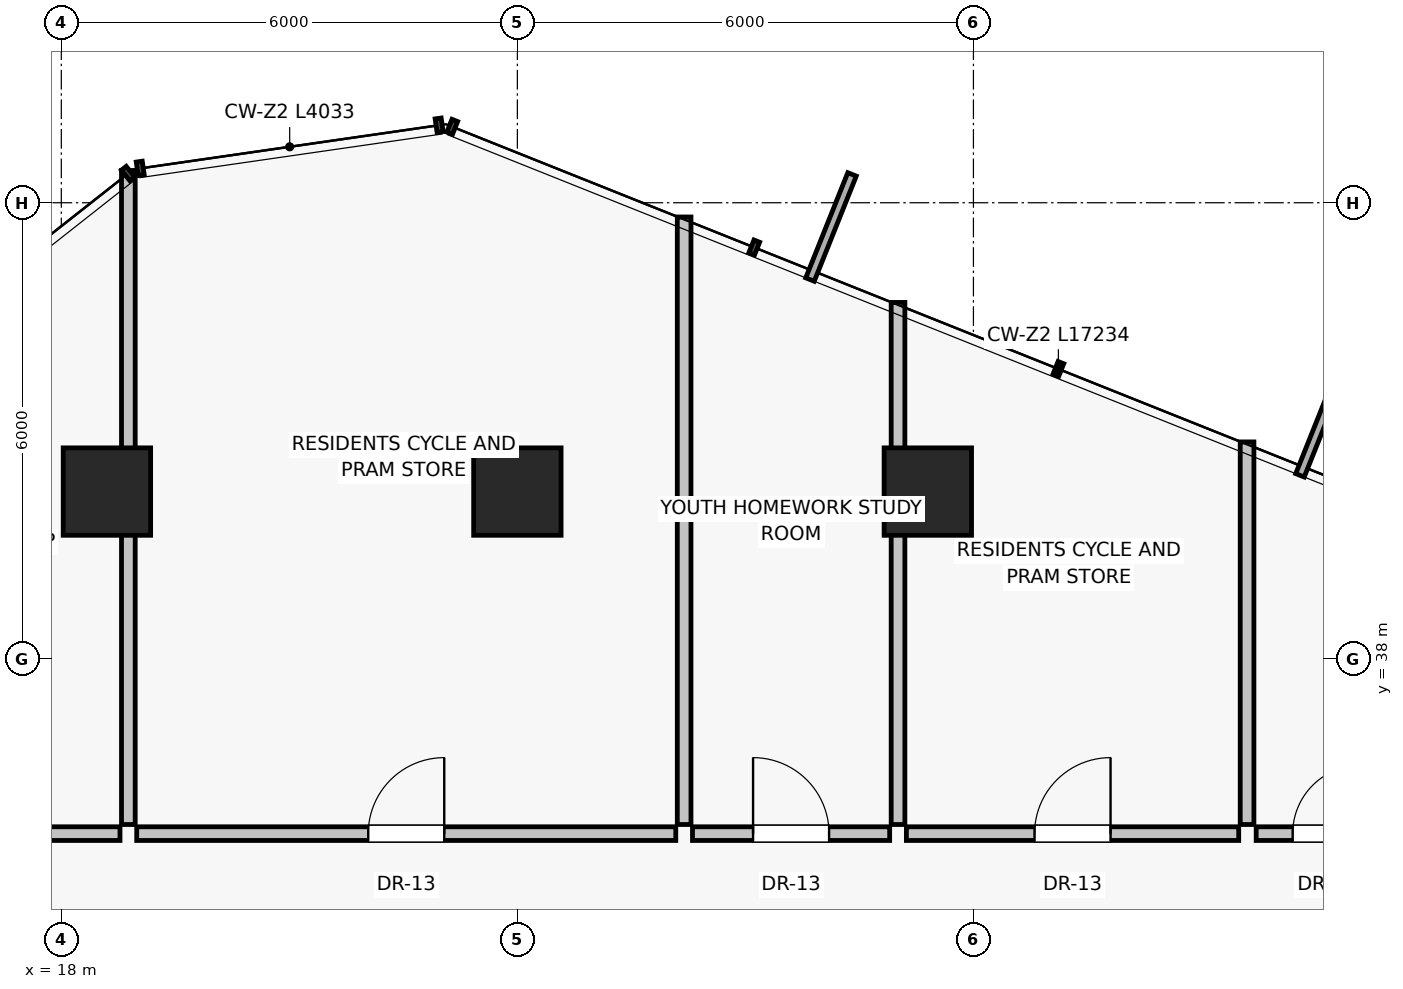
"""IFC4 building model, lengths in metres.
Left out: names, types, materials, properties, quantities, classifications, styles, units other than length and angle.
Written with IfcOpenShell. Run it as: python <this file> out.ifc"""

import sys

from ifc_helpers import new_model, si_unit, direction, frame, frame_2d, origin, origin_2d, place, context, subcontext, project, spatial, rectangle, extrude, source, transform, mapped, element, fill, save


model = new_model("IFC4")
c1 = context("Model", 3, precision=1e-05, world=origin(), true_north=direction((0.0, 1.0)))
c2 = subcontext(c1, "Body", "Model", "MODEL_VIEW")
j1 = project(units=[si_unit("LENGTHUNIT", "METRE"), si_unit("PLANEANGLEUNIT", "RADIAN")], contexts=[c1])
p1 = place(None, origin())
s1 = spatial("IfcSite", under=j1, at=p1, CompositionType="ELEMENT")
p2 = place(p1, origin())
s2 = spatial("IfcBuilding", under=s1, at=p2, CompositionType="ELEMENT")
p3 = place(p2, frame((0.0, 0.0, 155.5)))
s3 = spatial("IfcBuildingStorey", under=s2, at=p3, CompositionType="ELEMENT", Elevation=155.5)
for number, where, z_axis, x_axis in (
    (1, (29.4, 40.2, 0.0), (0.0, 0.0, 1.0), (1.0, 0.0, 0.0)),
    (2, (24.0, 40.2, 0.0), (0.0, 0.0, 1.0), (1.0, 0.0, 0.0)),
    (3, (18.6, 40.2, 0.0), (0.0, 0.0, 1.0), (1.0, 0.0, 0.0)),
):
    element("IfcColumn", number, at=place(p3, frame(where, z_axis=z_axis, x_axis=x_axis)), inside=s3, PredefinedType="COLUMN", context=c2, shape_type="SweptSolid", body=[
        extrude(rectangle(XDim=1.15, YDim=1.15, at=origin_2d()), origin(), (0.0, 0.0, 1.0), 3.25),
    ])
p4 = place(p3, frame((33.6, 35.82, 0.0), z_axis=(0.0, 0.0, 1.0), x_axis=(0.0, 1.0, 0.0)))
e4 = element("IfcWall", 4, at=p4, inside=s3, PredefinedType="PARTITIONING", context=c2, shape_type="SweptSolid", body=[
    extrude(rectangle(XDim=5.033, YDim=0.18, at=frame_2d((2.517, 0.0))), origin(), (0.0, 0.0, 1.0), 2.97),
])
p5 = place(p3, frame((14.51, 35.7, 0.0), z_axis=(0.0, 0.0, 1.0), x_axis=(1.0, 0.0, 0.0)))
e5 = element("IfcWall", 5, at=p5, inside=s3, PredefinedType="PARTITIONING", context=c2, shape_type="SweptSolid", body=[
    extrude(rectangle(XDim=4.262, YDim=0.18, at=frame_2d((2.131, 0.0))), origin(), (0.0, 0.0, 1.0), 2.55),
])
p6 = place(p5, frame((1.631, 0.0, 0.0)))
e6 = element("IfcOpeningElement", 6, at=p6, cuts=e5, PredefinedType="OPENING", context=c2, shape_type="SweptSolid", body=[
    extrude(rectangle(XDim=1.0, YDim=2.01, at=frame_2d((0.5, 1.005))), frame((0.0, 0.1, 0.0), z_axis=(0.0, -1.0, 0.0), x_axis=(1.0, 0.0, 0.0)), (0.0, 0.0, 1.0), 0.2),
])
p7 = place(p3, frame((18.992, 35.7, 0.0), z_axis=(0.0, 0.0, 1.0), x_axis=(1.0, 0.0, 0.0)))
e7 = element("IfcWall", 7, at=p7, inside=s3, PredefinedType="PARTITIONING", context=c2, shape_type="SweptSolid", body=[
    extrude(rectangle(XDim=7.092, YDim=0.18, at=frame_2d((3.546, 0.0))), origin(), (0.0, 0.0, 1.0), 2.55),
])
p8 = place(p7, frame((3.046, 0.0, 0.0)))
e8 = element("IfcOpeningElement", 8, at=p8, cuts=e7, PredefinedType="OPENING", context=c2, shape_type="SweptSolid", body=[
    extrude(rectangle(XDim=1.0, YDim=2.01, at=frame_2d((0.5, 1.005))), frame((0.0, 0.1, 0.0), z_axis=(0.0, -1.0, 0.0), x_axis=(1.0, 0.0, 0.0)), (0.0, 0.0, 1.0), 0.2),
])
p9 = place(p3, frame((18.882, 35.82, 0.0), z_axis=(0.0, 0.0, 1.0), x_axis=(0.0, 1.0, 0.0)))
e9 = element("IfcWall", 9, at=p9, inside=s3, PredefinedType="PARTITIONING", context=c2, shape_type="SweptSolid", body=[
    extrude(rectangle(XDim=8.604, YDim=0.18, at=frame_2d((4.302, 0.0))), origin(), (0.0, 0.0, 1.0), 2.348),
])
p10 = place(p3, frame((26.194, 35.82, 0.0), z_axis=(0.0, 0.0, 1.0), x_axis=(0.0, 1.0, 0.0)))
e10 = element("IfcWall", 10, at=p10, inside=s3, PredefinedType="PARTITIONING", context=c2, shape_type="SweptSolid", body=[
    extrude(rectangle(XDim=7.993, YDim=0.18, at=frame_2d((3.996, 0.0))), origin(), (0.0, 0.0, 1.0), 2.97),
])
p11 = place(p3, frame((26.304, 35.7, 0.0), z_axis=(0.0, 0.0, 1.0), x_axis=(1.0, 0.0, 0.0)))
e11 = element("IfcWall", 11, at=p11, inside=s3, PredefinedType="PARTITIONING", context=c2, shape_type="SweptSolid", body=[
    extrude(rectangle(XDim=2.594, YDim=0.18, at=frame_2d((1.297, 0.0))), origin(), (0.0, 0.0, 1.0), 2.55),
])
p12 = place(p11, frame((0.797, 0.0, 0.0)))
e12 = element("IfcOpeningElement", 12, at=p12, cuts=e11, PredefinedType="OPENING", context=c2, shape_type="SweptSolid", body=[
    extrude(rectangle(XDim=1.0, YDim=2.01, at=frame_2d((0.5, 1.005))), frame((0.0, 0.1, 0.0), z_axis=(0.0, -1.0, 0.0), x_axis=(1.0, 0.0, 0.0)), (0.0, 0.0, 1.0), 0.2),
])
p13 = place(p3, frame((29.118, 35.7, 0.0), z_axis=(0.0, 0.0, 1.0), x_axis=(1.0, 0.0, 0.0)))
e13 = element("IfcWall", 13, at=p13, inside=s3, PredefinedType="PARTITIONING", context=c2, shape_type="SweptSolid", body=[
    extrude(rectangle(XDim=4.372, YDim=0.18, at=frame_2d((2.186, 0.0))), origin(), (0.0, 0.0, 1.0), 2.55),
])
p14 = place(p13, frame((1.686, 0.0, 0.0)))
e14 = element("IfcOpeningElement", 14, at=p14, cuts=e13, PredefinedType="OPENING", context=c2, shape_type="SweptSolid", body=[
    extrude(rectangle(XDim=1.0, YDim=2.01, at=frame_2d((0.5, 1.005))), frame((0.0, 0.1, 0.0), z_axis=(0.0, -1.0, 0.0), x_axis=(1.0, 0.0, 0.0)), (0.0, 0.0, 1.0), 0.2),
])
p15 = place(p3, frame((29.008, 35.82, 0.0), z_axis=(0.0, 0.0, 1.0), x_axis=(0.0, 1.0, 0.0)))
e15 = element("IfcWall", 15, at=p15, inside=s3, PredefinedType="PARTITIONING", context=c2, shape_type="SweptSolid", body=[
    extrude(rectangle(XDim=6.868, YDim=0.18, at=frame_2d((3.434, 0.0))), origin(), (0.0, 0.0, 1.0), 2.348),
])
p16 = place(p3, frame((33.72, 35.7, 0.0), z_axis=(0.0, 0.0, 1.0), x_axis=(1.0, 0.0, 0.0)))
e16 = element("IfcWall", 16, at=p16, inside=s3, PredefinedType="PARTITIONING", context=c2, shape_type="SweptSolid", body=[
    extrude(rectangle(XDim=1.86, YDim=0.18, at=frame_2d((0.93, 0.0))), origin(), (0.0, 0.0, 1.0), 2.97),
])
p17 = place(p16, frame((0.48, 0.0, 0.0)))
e17 = element("IfcOpeningElement", 17, at=p17, cuts=e16, PredefinedType="OPENING", context=c2, shape_type="SweptSolid", body=[
    extrude(rectangle(XDim=0.9, YDim=2.01, at=frame_2d((0.45, 1.005))), frame((0.0, 0.1, 0.0), z_axis=(0.0, -1.0, 0.0), x_axis=(1.0, 0.0, 0.0)), (0.0, 0.0, 1.0), 0.2),
])
m1 = source(origin(), c2, "Body", "SweptSolid", [
    extrude(rectangle(XDim=1.0, YDim=2.01, at=frame_2d((0.5, 1.005))), frame((0.0, 0.025, 0.0), z_axis=(0.0, -1.0, 0.0), x_axis=(1.0, 0.0, 0.0)), (0.0, 0.0, 1.0), 0.05),
])
p18 = place(p8, origin())
e18 = element("IfcDoor", 18, at=p18, inside=s3, OperationType="SINGLE_SWING_RIGHT", PredefinedType="DOOR", context=c2, shape_type="MappedRepresentation", body=[
    mapped(m1, transform((0.0, 0.0, 0.0), scale=1.0)),
])
fill(e8, e18)
p19 = place(p12, origin())
e19 = element("IfcDoor", 19, at=p19, inside=s3, OperationType="SINGLE_SWING_LEFT", PredefinedType="DOOR", context=c2, shape_type="MappedRepresentation", body=[
    mapped(m1, transform((0.0, 0.0, 0.0), scale=1.0)),
])
fill(e12, e19)
p20 = place(p14, origin())
e20 = element("IfcDoor", 20, at=p20, inside=s3, OperationType="SINGLE_SWING_RIGHT", PredefinedType="DOOR", context=c2, shape_type="MappedRepresentation", body=[
    mapped(m1, transform((0.0, 0.0, 0.0), scale=1.0)),
])
fill(e14, e20)
m2 = source(origin(), c2, "Body", "SweptSolid", [
    extrude(rectangle(XDim=0.9, YDim=2.01, at=frame_2d((0.45, 1.005))), frame((0.0, 0.025, 0.0), z_axis=(0.0, -1.0, 0.0), x_axis=(1.0, 0.0, 0.0)), (0.0, 0.0, 1.0), 0.05),
])
p21 = place(p17, origin())
e21 = element("IfcDoor", 21, at=p21, inside=s3, OperationType="SINGLE_SWING_RIGHT", PredefinedType="DOOR", context=c2, shape_type="MappedRepresentation", body=[
    mapped(m2, transform((0.0, 0.0, 0.0), scale=1.0)),
])
fill(e17, e21)
save(model, sys.argv[1])
